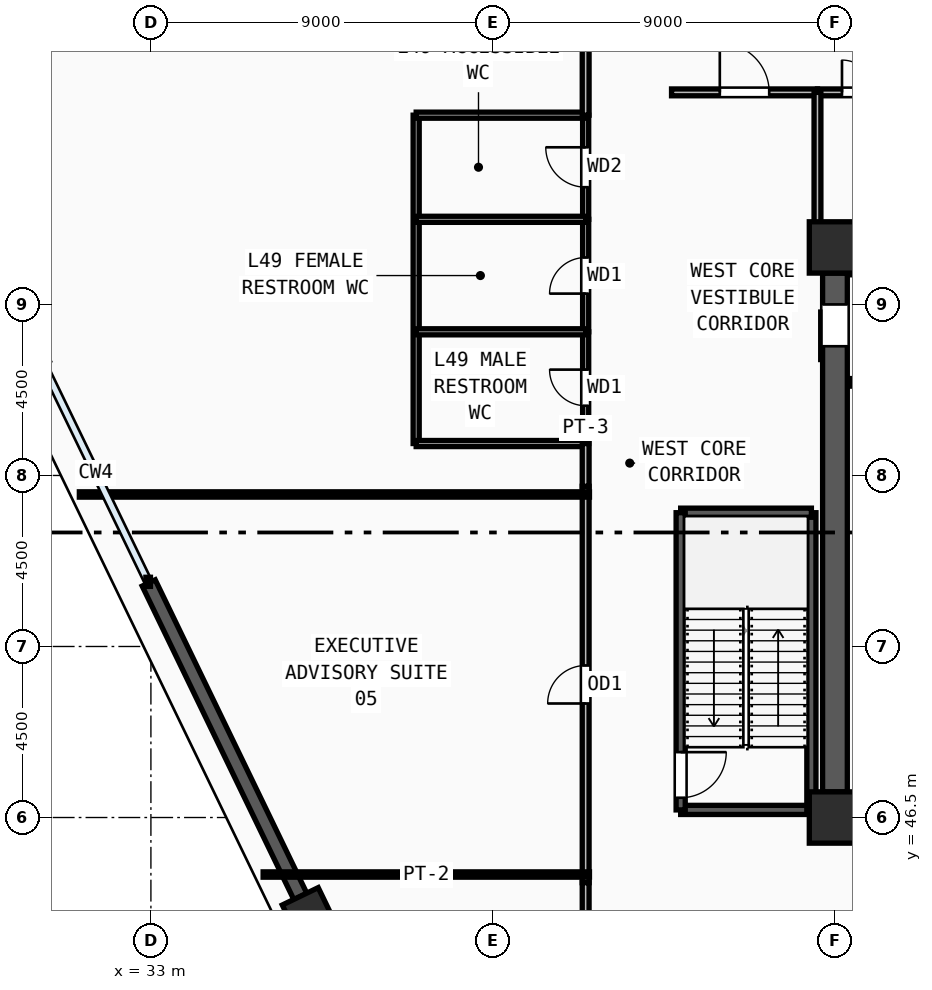
"""IFC4 building model, lengths in metres.
Left out: names, types, materials, properties, quantities, classifications, styles, units other than length and angle.
Written with IfcOpenShell. Run it as: python <this file> out.ifc"""

import sys

from ifc_helpers import new_model, si_unit, direction, frame, frame_2d, origin, origin_2d, place, context, subcontext, project, spatial, rectangle, extrude, source, transform, mapped, element, fill, save


model = new_model("IFC4")
c1 = context("Model", 3, precision=1e-05, world=origin(), true_north=direction((0.0, 1.0)))
c2 = subcontext(c1, "Body", "Model", "MODEL_VIEW")
j1 = project(units=[si_unit("LENGTHUNIT", "METRE"), si_unit("PLANEANGLEUNIT", "RADIAN")], contexts=[c1])
p1 = place(None, origin())
s1 = spatial("IfcSite", under=j1, at=p1, CompositionType="ELEMENT")
p2 = place(p1, origin())
s2 = spatial("IfcBuilding", under=s1, at=p2, CompositionType="ELEMENT")
p3 = place(p2, frame((0.0, 0.0, 189.75)))
s3 = spatial("IfcBuildingStorey", under=s2, at=p3, CompositionType="ELEMENT", Elevation=189.75)
m1 = source(origin(), c2, "Body", "SweptSolid", [
    extrude(rectangle(XDim=1.35, YDim=1.35, at=origin_2d()), origin(), (0.0, 0.0, 1.0), 4.5),
])
for number, where, z_axis, x_axis in (
    (1, (51.0, 46.5, 0.0), (0.0, 0.0, 1.0), (1.0, 0.0, 0.0)),
    (2, (51.0, 61.5, 0.0), (0.0, 0.0, 1.0), (1.0, 0.0, 0.0)),
):
    element("IfcColumn", number, at=place(p3, frame(where, z_axis=z_axis, x_axis=x_axis)), inside=s3, PredefinedType="COLUMN", context=c2, shape_type="MappedRepresentation", body=[
        mapped(m1, transform((0.0, 0.0, 0.0), x_axis=(1.0, 0.0, 0.0), y_axis=(0.0, 1.0, 0.0), z_axis=(0.0, 0.0, 1.0), scale=1.0)),
    ])
m2 = source(origin(), c2, "Body", "SweptSolid", [
    extrude(rectangle(XDim=1.25, YDim=1.05, at=origin_2d()), origin(), (0.0, 0.0, 1.0), 4.5),
])
p4 = place(p3, frame((37.202, 43.864, 0.0), z_axis=(0.0, 0.0, 1.0), x_axis=(-0.435388228011, 0.900242795533, 0.0)))
e3 = element("IfcColumn", 3, at=p4, inside=s3, PredefinedType="COLUMN", context=c2, shape_type="MappedRepresentation", body=[
    mapped(m2, transform((0.0, 0.0, 0.0), x_axis=(1.0, 0.0, 0.0), y_axis=(0.0, 1.0, 0.0), z_axis=(0.0, 0.0, 1.0), scale=1.0)),
])
p5 = place(p3, frame((32.942, 52.672, 0.0), z_axis=(0.0, 0.0, 1.0), x_axis=(0.435405716841, -0.900234337127, 0.0)))
e4 = element("IfcWall", 4, at=p5, inside=s3, PredefinedType="SOLIDWALL", context=c2, shape_type="SweptSolid", body=[
    extrude(rectangle(XDim=9.169, YDim=0.38, at=frame_2d((4.584, 0.0))), origin(), (0.0, 0.0, 1.0), 4.32),
])
p6 = place(p3, frame((51.0, 47.175, 0.0), z_axis=(0.0, 0.0, 1.0), x_axis=(0.0, 1.0, 0.0)))
e5 = element("IfcWall", 5, at=p6, inside=s3, PredefinedType="SHEAR", context=c2, shape_type="SweptSolid", body=[
    extrude(rectangle(XDim=13.65, YDim=0.65, at=frame_2d((6.825, 0.0))), origin(), (0.0, 0.0, 1.0), 4.32),
])
m3 = source(origin(), c2, "Body", "SweptSolid", [
    extrude(rectangle(XDim=1.1, YDim=2.2, at=frame_2d((0.55, 1.1))), frame((0.0, 0.335, 0.0), z_axis=(0.0, -1.0, 0.0), x_axis=(1.0, 0.0, 0.0)), (0.0, 0.0, 1.0), 0.67),
])
p7 = place(p6, frame((11.725, 0.0, 0.0)))
e6 = element("IfcOpeningElement", 6, at=p7, cuts=e5, PredefinedType="OPENING", context=c2, shape_type="MappedRepresentation", body=[
    mapped(m3, transform((0.0, 0.0, 0.0), x_axis=(1.0, 0.0, 0.0), y_axis=(0.0, 1.0, 0.0), z_axis=(0.0, 0.0, 1.0), scale=1.0)),
])
p8 = place(p3, frame((46.94, 46.7, 0.0), z_axis=(0.0, 0.0, 1.0), x_axis=(1.0, 0.0, 0.0)))
e7 = element("IfcWall", 7, at=p8, inside=s3, PredefinedType="SOLIDWALL", context=c2, shape_type="SweptSolid", body=[
    extrude(rectangle(XDim=3.44, YDim=0.24, at=frame_2d((1.72, 0.0))), origin(), (0.0, 0.0, 1.0), 4.32),
])
p9 = place(p3, frame((50.38, 46.7, 0.0), z_axis=(0.0, 0.0, 1.0), x_axis=(0.0, 1.0, 0.0)))
e8 = element("IfcWall", 8, at=p9, inside=s3, PredefinedType="SOLIDWALL", context=c2, shape_type="SweptSolid", body=[
    extrude(rectangle(XDim=7.82, YDim=0.24, at=frame_2d((3.91, 0.0))), origin(), (0.0, 0.0, 1.0), 4.32),
])
p10 = place(p3, frame((50.38, 54.52, 0.0), z_axis=(0.0, 0.0, 1.0), x_axis=(-1.0, 0.0, 0.0)))
e9 = element("IfcWall", 9, at=p10, inside=s3, PredefinedType="SOLIDWALL", context=c2, shape_type="SweptSolid", body=[
    extrude(rectangle(XDim=3.44, YDim=0.24, at=frame_2d((1.72, 0.0))), origin(), (0.0, 0.0, 1.0), 4.32),
])
p11 = place(p3, frame((46.94, 54.52, 0.0), z_axis=(0.0, 0.0, 1.0), x_axis=(0.0, -1.0, 0.0)))
e10 = element("IfcWall", 10, at=p11, inside=s3, PredefinedType="SOLIDWALL", context=c2, shape_type="SweptSolid", body=[
    extrude(rectangle(XDim=7.82, YDim=0.24, at=frame_2d((3.91, 0.0))), origin(), (0.0, 0.0, 1.0), 4.32),
])
m4 = source(origin(), c2, "Body", "SweptSolid", [
    extrude(rectangle(XDim=1.2, YDim=2.2, at=frame_2d((0.6, 1.1))), frame((0.0, 0.13, 0.0), z_axis=(0.0, -1.0, 0.0), x_axis=(1.0, 0.0, 0.0)), (0.0, 0.0, 1.0), 0.26),
])
p12 = place(p11, frame((6.3, 0.0, 0.0)))
e11 = element("IfcOpeningElement", 11, at=p12, cuts=e10, PredefinedType="OPENING", context=c2, shape_type="MappedRepresentation", body=[
    mapped(m4, transform((0.0, 0.0, 0.0), x_axis=(1.0, 0.0, 0.0), y_axis=(0.0, 1.0, 0.0), z_axis=(0.0, 0.0, 1.0), scale=1.0)),
])
for number, where, z_axis, x_axis in (
    (12, (51.4, 57.95, 0.0), (0.0, 0.0, 1.0), (1.0, 0.0, 0.0)),
    (13, (53.8, 60.88, 0.0), (0.0, 0.0, 1.0), (-1.0, 0.0, 0.0)),
):
    element("IfcWall", number, at=place(p3, frame(where, z_axis=z_axis, x_axis=x_axis)), inside=s3, PredefinedType="SOLIDWALL", context=c2, shape_type="SweptSolid", body=[
        extrude(rectangle(XDim=2.4, YDim=0.2, at=frame_2d((1.2, 0.0))), origin(), (0.0, 0.0, 1.0), 4.32),
    ])
p13 = place(p3, frame((44.44, 56.34, 0.0), z_axis=(0.0, 0.0, 1.0), x_axis=(0.0, 1.0, 0.0)))
e14 = element("IfcWall", 14, at=p13, inside=s3, PredefinedType="PARTITIONING", context=c2, shape_type="SweptSolid", body=[
    extrude(rectangle(XDim=2.94, YDim=0.16, at=frame_2d((1.47, 0.0))), origin(), (0.0, 0.0, 1.0), 4.32),
])
m5 = source(origin(), c2, "Body", "SweptSolid", [
    extrude(rectangle(XDim=0.95, YDim=2.15, at=frame_2d((0.475, 1.075))), frame((0.0, 0.09, 0.0), z_axis=(0.0, -1.0, 0.0), x_axis=(1.0, 0.0, 0.0)), (0.0, 0.0, 1.0), 0.18),
])
p14 = place(p13, frame((0.995, 0.0, 0.0)))
e15 = element("IfcOpeningElement", 15, at=p14, cuts=e14, PredefinedType="OPENING", context=c2, shape_type="MappedRepresentation", body=[
    mapped(m5, transform((0.0, 0.0, 0.0), x_axis=(1.0, 0.0, 0.0), y_axis=(0.0, 1.0, 0.0), z_axis=(0.0, 0.0, 1.0), scale=1.0)),
])
p15 = place(p3, frame((44.44, 59.28, 0.0), z_axis=(0.0, 0.0, 1.0), x_axis=(0.0, 1.0, 0.0)))
e16 = element("IfcWall", 16, at=p15, inside=s3, PredefinedType="PARTITIONING", context=c2, shape_type="SweptSolid", body=[
    extrude(rectangle(XDim=2.96, YDim=0.16, at=frame_2d((1.48, 0.0))), origin(), (0.0, 0.0, 1.0), 4.32),
])
p16 = place(p15, frame((1.005, 0.0, 0.0)))
e17 = element("IfcOpeningElement", 17, at=p16, cuts=e16, PredefinedType="OPENING", context=c2, shape_type="MappedRepresentation", body=[
    mapped(m5, transform((0.0, 0.0, 0.0), x_axis=(1.0, 0.0, 0.0), y_axis=(0.0, 1.0, 0.0), z_axis=(0.0, 0.0, 1.0), scale=1.0)),
])
p17 = place(p3, frame((44.44, 62.24, 0.0), z_axis=(0.0, 0.0, 1.0), x_axis=(0.0, 1.0, 0.0)))
e18 = element("IfcWall", 18, at=p17, inside=s3, PredefinedType="PARTITIONING", context=c2, shape_type="SweptSolid", body=[
    extrude(rectangle(XDim=2.74, YDim=0.16, at=frame_2d((1.37, 0.0))), origin(), (0.0, 0.0, 1.0), 4.32),
])
m6 = source(origin(), c2, "Body", "SweptSolid", [
    extrude(rectangle(XDim=1.05, YDim=2.15, at=frame_2d((0.525, 1.075))), frame((0.0, 0.09, 0.0), z_axis=(0.0, -1.0, 0.0), x_axis=(1.0, 0.0, 0.0)), (0.0, 0.0, 1.0), 0.18),
])
p18 = place(p17, frame((0.845, 0.0, 0.0)))
e19 = element("IfcOpeningElement", 19, at=p18, cuts=e18, PredefinedType="OPENING", context=c2, shape_type="MappedRepresentation", body=[
    mapped(m6, transform((0.0, 0.0, 0.0), x_axis=(1.0, 0.0, 0.0), y_axis=(0.0, 1.0, 0.0), z_axis=(0.0, 0.0, 1.0), scale=1.0)),
])
p19 = place(p3, frame((50.54, 65.58, 0.0), z_axis=(0.0, 0.0, 1.0), x_axis=(1.0, 0.0, 0.0)))
e20 = element("IfcWall", 20, at=p19, inside=s3, PredefinedType="PARTITIONING", context=c2, shape_type="SweptSolid", body=[
    extrude(rectangle(XDim=2.14, YDim=0.18, at=frame_2d((1.07, 0.0))), origin(), (0.0, 0.0, 1.0), 4.32),
])
m7 = source(origin(), c2, "Body", "SweptSolid", [
    extrude(rectangle(XDim=0.85, YDim=2.1, at=frame_2d((0.425, 1.05))), frame((0.0, 0.1, 0.0), z_axis=(0.0, -1.0, 0.0), x_axis=(1.0, 0.0, 0.0)), (0.0, 0.0, 1.0), 0.2),
])
p20 = place(p19, frame((0.645, 0.0, 0.0)))
e21 = element("IfcOpeningElement", 21, at=p20, cuts=e20, PredefinedType="OPENING", context=c2, shape_type="MappedRepresentation", body=[
    mapped(m7, transform((0.0, 0.0, 0.0), x_axis=(1.0, 0.0, 0.0), y_axis=(0.0, 1.0, 0.0), z_axis=(0.0, 0.0, 1.0), scale=1.0)),
])
p21 = place(p3, frame((46.7, 65.58, 0.0), z_axis=(0.0, 0.0, 1.0), x_axis=(1.0, 0.0, 0.0)))
e22 = element("IfcWall", 22, at=p21, inside=s3, PredefinedType="PARTITIONING", context=c2, shape_type="SweptSolid", body=[
    extrude(rectangle(XDim=3.84, YDim=0.18, at=frame_2d((1.92, 0.0))), origin(), (0.0, 0.0, 1.0), 4.32),
])
m8 = source(origin(), c2, "Body", "SweptSolid", [
    extrude(rectangle(XDim=1.3, YDim=2.2, at=frame_2d((0.65, 1.1))), frame((0.0, 0.1, 0.0), z_axis=(0.0, -1.0, 0.0), x_axis=(1.0, 0.0, 0.0)), (0.0, 0.0, 1.0), 0.2),
])
p22 = place(p21, frame((1.27, 0.0, 0.0)))
e23 = element("IfcOpeningElement", 23, at=p22, cuts=e22, PredefinedType="OPENING", context=c2, shape_type="MappedRepresentation", body=[
    mapped(m8, transform((0.0, 0.0, 0.0), x_axis=(1.0, 0.0, 0.0), y_axis=(0.0, 1.0, 0.0), z_axis=(0.0, 0.0, 1.0), scale=1.0)),
])
p23 = place(p3, frame((44.44, 44.785, 0.0), z_axis=(0.0, 0.0, 1.0), x_axis=(0.0, 1.0, 0.0)))
e24 = element("IfcWall", 24, at=p23, inside=s3, PredefinedType="PARTITIONING", context=c2, shape_type="SweptSolid", body=[
    extrude(rectangle(XDim=10.43, YDim=0.18, at=frame_2d((5.215, 0.0))), origin(), (0.0, 0.0, 1.0), 3.955),
])
m9 = source(origin(), c2, "Body", "SweptSolid", [
    extrude(rectangle(XDim=1.0, YDim=2.2, at=frame_2d((0.5, 1.1))), frame((0.0, 0.1, 0.0), z_axis=(0.0, -1.0, 0.0), x_axis=(1.0, 0.0, 0.0)), (0.0, 0.0, 1.0), 0.2),
])
p24 = place(p23, frame((4.715, 0.0, 0.0)))
e25 = element("IfcOpeningElement", 25, at=p24, cuts=e24, PredefinedType="OPENING", context=c2, shape_type="MappedRepresentation", body=[
    mapped(m9, transform((0.0, 0.0, 0.0), x_axis=(1.0, 0.0, 0.0), y_axis=(0.0, 1.0, 0.0), z_axis=(0.0, 0.0, 1.0), scale=1.0)),
])
p25 = place(p3, frame((39.98, 56.34, 0.0), z_axis=(0.0, 0.0, 1.0), x_axis=(0.0, 1.0, 0.0)))
e26 = element("IfcWall", 26, at=p25, inside=s3, PredefinedType="PARTITIONING", context=c2, shape_type="SweptSolid", body=[
    extrude(rectangle(XDim=8.64, YDim=0.16, at=frame_2d((4.32, 0.0))), origin(), (0.0, 0.0, 1.0), 4.32),
])
for number, where, z_axis, x_axis in (
    (27, (39.98, 56.34, 0.0), (0.0, 0.0, 1.0), (1.0, 0.0, 0.0)),
    (28, (39.98, 59.28, 0.0), (0.0, 0.0, 1.0), (1.0, 0.0, 0.0)),
    (29, (39.98, 62.24, 0.0), (0.0, 0.0, 1.0), (1.0, 0.0, 0.0)),
    (30, (39.98, 64.98, 0.0), (0.0, 0.0, 1.0), (1.0, 0.0, 0.0)),
):
    element("IfcWall", number, at=place(p3, frame(where, z_axis=z_axis, x_axis=x_axis)), inside=s3, PredefinedType="PARTITIONING", context=c2, shape_type="SweptSolid", body=[
        extrude(rectangle(XDim=4.46, YDim=0.16, at=frame_2d((2.23, 0.0))), origin(), (0.0, 0.0, 1.0), 4.32),
    ])
p26 = place(p3, frame((50.54, 61.95, 0.0), z_axis=(0.0, 0.0, 1.0), x_axis=(0.0, 1.0, 0.0)))
e31 = element("IfcWall", 31, at=p26, inside=s3, PredefinedType="PARTITIONING", context=c2, shape_type="SweptSolid", body=[
    extrude(rectangle(XDim=3.63, YDim=0.18, at=frame_2d((1.815, 0.0))), origin(), (0.0, 0.0, 1.0), 4.32),
])
p27 = place(p3, frame((44.44, 64.98, 0.0), z_axis=(0.0, 0.0, 1.0), x_axis=(0.0, 1.0, 0.0)))
e32 = element("IfcWall", 32, at=p27, inside=s3, PredefinedType="PARTITIONING", context=c2, shape_type="SweptSolid", body=[
    extrude(rectangle(XDim=3.0, YDim=0.18, at=frame_2d((1.5, 0.0))), origin(), (0.0, 0.0, 1.0), 4.32),
])
p28 = place(p3, frame((44.44, 55.215, 0.0), z_axis=(0.0, 0.0, 1.0), x_axis=(0.0, 1.0, 0.0)))
e33 = element("IfcWall", 33, at=p28, inside=s3, PredefinedType="PARTITIONING", context=c2, shape_type="SweptSolid", body=[
    extrude(rectangle(XDim=1.125, YDim=0.18, at=frame_2d((0.562, 0.0))), origin(), (0.0, 0.0, 1.0), 4.32),
])
p29 = place(p3, frame((44.44, 43.67, 0.0), z_axis=(0.0, 0.0, 1.0), x_axis=(0.0, 1.0, 0.0)))
e34 = element("IfcWall", 34, at=p29, inside=s3, PredefinedType="PARTITIONING", context=c2, shape_type="SweptSolid", body=[
    extrude(rectangle(XDim=1.115, YDim=0.18, at=frame_2d((0.558, 0.0))), origin(), (0.0, 0.0, 1.0), 4.32),
])
p30 = place(p3, frame((44.54, 45.0, 0.0), z_axis=(0.0, 0.0, 1.0), x_axis=(-1.0, 0.0, 0.0)))
e35 = element("IfcWall", 35, at=p30, inside=s3, PredefinedType="PARTITIONING", context=c2, shape_type="SweptSolid", body=[
    extrude(rectangle(XDim=8.587, YDim=0.14, at=frame_2d((4.293, 0.0))), origin(), (0.0, 0.0, 1.0), 4.32),
])
p31 = place(p3, frame((44.54, 55.0, 0.0), z_axis=(0.0, 0.0, 1.0), x_axis=(-1.0, 0.0, 0.0)))
e36 = element("IfcWall", 36, at=p31, inside=s3, PredefinedType="PARTITIONING", context=c2, shape_type="SweptSolid", body=[
    extrude(rectangle(XDim=13.423, YDim=0.14, at=frame_2d((6.711, 0.0))), origin(), (0.0, 0.0, 1.0), 4.32),
])
m10 = source(origin(), c2, "Body", "SweptSolid", [
    extrude(rectangle(XDim=1.2, YDim=2.2, at=frame_2d((0.6, 1.1))), frame((0.0, 0.025, 0.0), z_axis=(0.0, -1.0, 0.0), x_axis=(1.0, 0.0, 0.0)), (0.0, 0.0, 1.0), 0.05),
])
p32 = place(p12, origin())
e37 = element("IfcDoor", 37, at=p32, inside=s3, OperationType="SINGLE_SWING_LEFT", PredefinedType="DOOR", context=c2, shape_type="MappedRepresentation", body=[
    mapped(m10, transform((0.0, 0.0, 0.0), x_axis=(1.0, 0.0, 0.0), y_axis=(0.0, 1.0, 0.0), z_axis=(0.0, 0.0, 1.0), scale=1.0)),
])
fill(e11, e37)
m11 = source(origin(), c2, "Body", "SweptSolid", [
    extrude(rectangle(XDim=1.1, YDim=2.2, at=frame_2d((0.55, 1.1))), frame((0.0, 0.025, 0.0), z_axis=(0.0, -1.0, 0.0), x_axis=(1.0, 0.0, 0.0)), (0.0, 0.0, 1.0), 0.05),
])
p33 = place(p7, origin())
e38 = element("IfcDoor", 38, at=p33, inside=s3, OperationType="SLIDING_TO_LEFT", PredefinedType="DOOR", context=c2, shape_type="MappedRepresentation", body=[
    mapped(m11, transform((0.0, 0.0, 0.0), x_axis=(1.0, 0.0, 0.0), y_axis=(0.0, 1.0, 0.0), z_axis=(0.0, 0.0, 1.0), scale=1.0)),
])
fill(e6, e38)
m12 = source(origin(), c2, "Body", "SweptSolid", [
    extrude(rectangle(XDim=0.95, YDim=2.15, at=frame_2d((0.475, 1.075))), frame((0.0, 0.025, 0.0), z_axis=(0.0, -1.0, 0.0), x_axis=(1.0, 0.0, 0.0)), (0.0, 0.0, 1.0), 0.05),
])
p34 = place(p14, origin())
e39 = element("IfcDoor", 39, at=p34, inside=s3, OperationType="SINGLE_SWING_RIGHT", PredefinedType="DOOR", context=c2, shape_type="MappedRepresentation", body=[
    mapped(m12, transform((0.0, 0.0, 0.0), x_axis=(1.0, 0.0, 0.0), y_axis=(0.0, 1.0, 0.0), z_axis=(0.0, 0.0, 1.0), scale=1.0)),
])
fill(e15, e39)
p35 = place(p16, origin())
e40 = element("IfcDoor", 40, at=p35, inside=s3, OperationType="SINGLE_SWING_LEFT", PredefinedType="DOOR", context=c2, shape_type="MappedRepresentation", body=[
    mapped(m12, transform((0.0, 0.0, 0.0), x_axis=(1.0, 0.0, 0.0), y_axis=(0.0, 1.0, 0.0), z_axis=(0.0, 0.0, 1.0), scale=1.0)),
])
fill(e17, e40)
m13 = source(origin(), c2, "Body", "SweptSolid", [
    extrude(rectangle(XDim=1.05, YDim=2.15, at=frame_2d((0.525, 1.075))), frame((0.0, 0.025, 0.0), z_axis=(0.0, -1.0, 0.0), x_axis=(1.0, 0.0, 0.0)), (0.0, 0.0, 1.0), 0.05),
])
p36 = place(p18, origin())
e41 = element("IfcDoor", 41, at=p36, inside=s3, OperationType="SINGLE_SWING_RIGHT", PredefinedType="DOOR", context=c2, shape_type="MappedRepresentation", body=[
    mapped(m13, transform((0.0, 0.0, 0.0), x_axis=(1.0, 0.0, 0.0), y_axis=(0.0, 1.0, 0.0), z_axis=(0.0, 0.0, 1.0), scale=1.0)),
])
fill(e19, e41)
m14 = source(origin(), c2, "Body", "SweptSolid", [
    extrude(rectangle(XDim=0.85, YDim=2.1, at=frame_2d((0.425, 1.05))), frame((0.0, 0.025, 0.0), z_axis=(0.0, -1.0, 0.0), x_axis=(1.0, 0.0, 0.0)), (0.0, 0.0, 1.0), 0.05),
])
p37 = place(p20, origin())
e42 = element("IfcDoor", 42, at=p37, inside=s3, OperationType="SINGLE_SWING_LEFT", PredefinedType="DOOR", context=c2, shape_type="MappedRepresentation", body=[
    mapped(m14, transform((0.0, 0.0, 0.0), x_axis=(1.0, 0.0, 0.0), y_axis=(0.0, 1.0, 0.0), z_axis=(0.0, 0.0, 1.0), scale=1.0)),
])
fill(e21, e42)
m15 = source(origin(), c2, "Body", "SweptSolid", [
    extrude(rectangle(XDim=1.3, YDim=2.2, at=frame_2d((0.65, 1.1))), frame((0.0, 0.025, 0.0), z_axis=(0.0, -1.0, 0.0), x_axis=(1.0, 0.0, 0.0)), (0.0, 0.0, 1.0), 0.05),
])
p38 = place(p22, origin())
e43 = element("IfcDoor", 43, at=p38, inside=s3, OperationType="SINGLE_SWING_LEFT", PredefinedType="DOOR", context=c2, shape_type="MappedRepresentation", body=[
    mapped(m15, transform((0.0, 0.0, 0.0), x_axis=(1.0, 0.0, 0.0), y_axis=(0.0, 1.0, 0.0), z_axis=(0.0, 0.0, 1.0), scale=1.0)),
])
fill(e23, e43)
m16 = source(origin(), c2, "Body", "SweptSolid", [
    extrude(rectangle(XDim=1.0, YDim=2.2, at=frame_2d((0.5, 1.1))), frame((0.0, 0.025, 0.0), z_axis=(0.0, -1.0, 0.0), x_axis=(1.0, 0.0, 0.0)), (0.0, 0.0, 1.0), 0.05),
])
p39 = place(p24, origin())
e44 = element("IfcDoor", 44, at=p39, inside=s3, OperationType="SINGLE_SWING_LEFT", PredefinedType="DOOR", context=c2, shape_type="MappedRepresentation", body=[
    mapped(m16, transform((0.0, 0.0, 0.0), x_axis=(1.0, 0.0, 0.0), y_axis=(0.0, 1.0, 0.0), z_axis=(0.0, 0.0, 1.0), scale=1.0)),
])
fill(e25, e44)
save(model, sys.argv[1])
